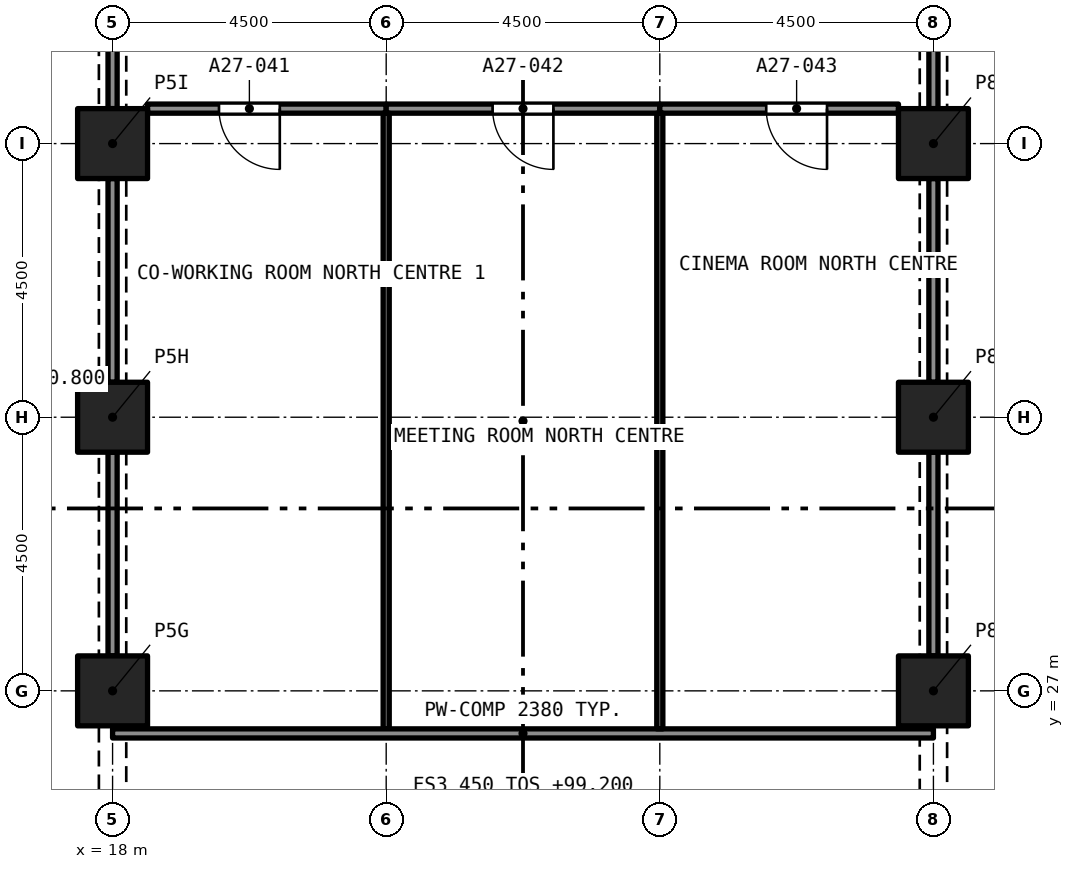
"""IFC4 building model, lengths in metres.
Left out: names, types, materials, properties, quantities, classifications, styles, units other than length and angle.
Written with IfcOpenShell. Run it as: python <this file> out.ifc"""

import sys

from ifc_helpers import new_model, si_unit, direction, frame, frame_2d, origin, origin_2d, place, context, subcontext, project, spatial, rectangle, extrude, element, fill, save


model = new_model("IFC4")
c1 = context("Model", 3, precision=1e-05, world=origin(), true_north=direction((0.0, 1.0)))
c2 = subcontext(c1, "Body", "Model", "MODEL_VIEW")
j1 = project(units=[si_unit("LENGTHUNIT", "METRE"), si_unit("PLANEANGLEUNIT", "RADIAN")], contexts=[c1])
p1 = place(None, origin())
s1 = spatial("IfcSite", under=j1, at=p1, CompositionType="ELEMENT")
p2 = place(p1, origin())
s2 = spatial("IfcBuilding", under=s1, at=p2, CompositionType="ELEMENT")
p3 = place(p2, frame((0.0, 0.0, 99.2)))
s3 = spatial("IfcBuildingStorey", under=s2, at=p3, CompositionType="ELEMENT", Elevation=99.2)
for number, where, z_axis, x_axis in (
    (1, (18.0, 27.0, 0.0), (0.0, 0.0, 1.0), (1.0, 0.0, 0.0)),
    (2, (31.5, 27.0, 0.0), (0.0, 0.0, 1.0), (1.0, 0.0, 0.0)),
    (3, (18.0, 31.5, 0.0), (0.0, 0.0, 1.0), (1.0, 0.0, 0.0)),
    (4, (31.5, 31.5, 0.0), (0.0, 0.0, 1.0), (1.0, 0.0, 0.0)),
    (5, (18.0, 36.0, 0.0), (0.0, 0.0, 1.0), (1.0, 0.0, 0.0)),
    (6, (31.5, 36.0, 0.0), (0.0, 0.0, 1.0), (1.0, 0.0, 0.0)),
):
    element("IfcColumn", number, at=place(p3, frame(where, z_axis=z_axis, x_axis=x_axis)), inside=s3, PredefinedType="COLUMN", context=c2, shape_type="SweptSolid", body=[
        extrude(rectangle(XDim=1.15, YDim=1.15, at=origin_2d()), origin(), (0.0, 0.0, 1.0), 3.2),
    ])
p4 = place(p3, frame((22.5, 36.575, 0.0), z_axis=(0.0, 0.0, 1.0), x_axis=(-1.0, 0.0, 0.0)))
e7 = element("IfcWall", 7, at=p4, inside=s3, PredefinedType="PARTITIONING", context=c2, shape_type="SweptSolid", body=[
    extrude(rectangle(XDim=3.925, YDim=0.15, at=frame_2d((1.962, 0.0))), origin(), (0.0, 0.0, 1.0), 2.75),
])
p5 = place(p4, frame((1.75, 0.0, 0.0)))
e8 = element("IfcOpeningElement", 8, at=p5, cuts=e7, PredefinedType="OPENING", context=c2, shape_type="SweptSolid", body=[
    extrude(rectangle(XDim=1.0, YDim=2.1, at=frame_2d((0.5, 1.05))), frame((0.0, 0.085, 0.0), z_axis=(0.0, -1.0, 0.0), x_axis=(1.0, 0.0, 0.0)), (0.0, 0.0, 1.0), 0.17),
])
p6 = place(p3, frame((27.0, 36.575, 0.0), z_axis=(0.0, 0.0, 1.0), x_axis=(-1.0, 0.0, 0.0)))
e9 = element("IfcWall", 9, at=p6, inside=s3, PredefinedType="PARTITIONING", context=c2, shape_type="SweptSolid", body=[
    extrude(rectangle(XDim=4.5, YDim=0.15, at=frame_2d((2.25, 0.0))), origin(), (0.0, 0.0, 1.0), 2.75),
])
p7 = place(p6, frame((1.75, 0.0, 0.0)))
e10 = element("IfcOpeningElement", 10, at=p7, cuts=e9, PredefinedType="OPENING", context=c2, shape_type="SweptSolid", body=[
    extrude(rectangle(XDim=1.0, YDim=2.1, at=frame_2d((0.5, 1.05))), frame((0.0, 0.085, 0.0), z_axis=(0.0, -1.0, 0.0), x_axis=(1.0, 0.0, 0.0)), (0.0, 0.0, 1.0), 0.17),
])
p8 = place(p3, frame((30.925, 36.575, 0.0), z_axis=(0.0, 0.0, 1.0), x_axis=(-1.0, 0.0, 0.0)))
e11 = element("IfcWall", 11, at=p8, inside=s3, PredefinedType="PARTITIONING", context=c2, shape_type="SweptSolid", body=[
    extrude(rectangle(XDim=3.925, YDim=0.15, at=frame_2d((1.962, 0.0))), origin(), (0.0, 0.0, 1.0), 2.75),
])
p9 = place(p8, frame((1.175, 0.0, 0.0)))
e12 = element("IfcOpeningElement", 12, at=p9, cuts=e11, PredefinedType="OPENING", context=c2, shape_type="SweptSolid", body=[
    extrude(rectangle(XDim=1.0, YDim=2.1, at=frame_2d((0.5, 1.05))), frame((0.0, 0.085, 0.0), z_axis=(0.0, -1.0, 0.0), x_axis=(1.0, 0.0, 0.0)), (0.0, 0.0, 1.0), 0.17),
])
p10 = place(p3, frame((31.5, 36.575, 0.0), z_axis=(0.0, 0.0, 1.0), x_axis=(0.0, 1.0, 0.0)))
e13 = element("IfcWall", 13, at=p10, inside=s3, PredefinedType="PARTITIONING", context=c2, shape_type="SweptSolid", body=[
    extrude(rectangle(XDim=3.35, YDim=0.15, at=frame_2d((1.675, 0.0))), origin(), (0.0, 0.0, 1.0), 2.38),
])
p11 = place(p10, frame((1.075, 0.0, 0.0)))
e14 = element("IfcOpeningElement", 14, at=p11, cuts=e13, PredefinedType="OPENING", context=c2, shape_type="SweptSolid", body=[
    extrude(rectangle(XDim=1.2, YDim=2.1, at=frame_2d((0.6, 1.05))), frame((0.0, 0.085, 0.0), z_axis=(0.0, -1.0, 0.0), x_axis=(1.0, 0.0, 0.0)), (0.0, 0.0, 1.0), 0.17),
])
p12 = place(p3, frame((18.0, 39.925, 0.0), z_axis=(0.0, 0.0, 1.0), x_axis=(0.0, -1.0, 0.0)))
e15 = element("IfcWall", 15, at=p12, inside=s3, PredefinedType="PARTITIONING", context=c2, shape_type="SweptSolid", body=[
    extrude(rectangle(XDim=3.35, YDim=0.15, at=frame_2d((1.675, 0.0))), origin(), (0.0, 0.0, 1.0), 2.38),
])
p13 = place(p12, frame((1.075, 0.0, 0.0)))
e16 = element("IfcOpeningElement", 16, at=p13, cuts=e15, PredefinedType="OPENING", context=c2, shape_type="SweptSolid", body=[
    extrude(rectangle(XDim=1.2, YDim=2.1, at=frame_2d((0.6, 1.05))), frame((0.0, 0.085, 0.0), z_axis=(0.0, -1.0, 0.0), x_axis=(1.0, 0.0, 0.0)), (0.0, 0.0, 1.0), 0.17),
])
p14 = place(p3, frame((22.5, 26.375, 0.0), z_axis=(0.0, 0.0, 1.0), x_axis=(0.0, 1.0, 0.0)))
e17 = element("IfcWall", 17, at=p14, inside=s3, PredefinedType="PARTITIONING", context=c2, shape_type="SweptSolid", body=[
    extrude(rectangle(XDim=10.125, YDim=0.1, at=frame_2d((5.062, 0.0))), origin(), (0.0, 0.0, 1.0), 2.75),
])
for number, where, z_axis, x_axis in (
    (18, (18.0, 27.575, 0.0), (0.0, 0.0, 1.0), (0.0, 1.0, 0.0)),
    (19, (18.0, 32.075, 0.0), (0.0, 0.0, 1.0), (0.0, 1.0, 0.0)),
):
    element("IfcWall", number, at=place(p3, frame(where, z_axis=z_axis, x_axis=x_axis)), inside=s3, PredefinedType="PARTITIONING", context=c2, shape_type="SweptSolid", body=[
        extrude(rectangle(XDim=3.35, YDim=0.15, at=frame_2d((1.675, 0.0))), origin(), (0.0, 0.0, 1.0), 2.38),
    ])
p15 = place(p3, frame((18.0, 26.3, 0.0), z_axis=(0.0, 0.0, 1.0), x_axis=(1.0, 0.0, 0.0)))
e20 = element("IfcWall", 20, at=p15, inside=s3, PredefinedType="PARTITIONING", context=c2, shape_type="SweptSolid", body=[
    extrude(rectangle(XDim=13.5, YDim=0.15, at=frame_2d((6.75, 0.0))), origin(), (0.0, 0.0, 1.0), 2.38),
])
p16 = place(p3, frame((27.0, 26.375, 0.0), z_axis=(0.0, 0.0, 1.0), x_axis=(0.0, 1.0, 0.0)))
e21 = element("IfcWall", 21, at=p16, inside=s3, PredefinedType="PARTITIONING", context=c2, shape_type="SweptSolid", body=[
    extrude(rectangle(XDim=10.125, YDim=0.1, at=frame_2d((5.062, 0.0))), origin(), (0.0, 0.0, 1.0), 2.75),
])
for number, where, z_axis, x_axis in (
    (22, (31.5, 32.075, 0.0), (0.0, 0.0, 1.0), (0.0, 1.0, 0.0)),
    (23, (31.5, 27.575, 0.0), (0.0, 0.0, 1.0), (0.0, 1.0, 0.0)),
):
    element("IfcWall", number, at=place(p3, frame(where, z_axis=z_axis, x_axis=x_axis)), inside=s3, PredefinedType="PARTITIONING", context=c2, shape_type="SweptSolid", body=[
        extrude(rectangle(XDim=3.35, YDim=0.15, at=frame_2d((1.675, 0.0))), origin(), (0.0, 0.0, 1.0), 2.38),
    ])
p17 = place(p5, origin())
e24 = element("IfcDoor", 24, at=p17, inside=s3, OperationType="SINGLE_SWING_RIGHT", PredefinedType="DOOR", context=c2, shape_type="SweptSolid", body=[
    extrude(rectangle(XDim=1.0, YDim=2.1, at=frame_2d((0.5, 1.05))), frame((0.0, 0.025, 0.0), z_axis=(0.0, -1.0, 0.0), x_axis=(1.0, 0.0, 0.0)), (0.0, 0.0, 1.0), 0.05),
])
fill(e8, e24)
p18 = place(p7, origin())
e25 = element("IfcDoor", 25, at=p18, inside=s3, OperationType="SINGLE_SWING_RIGHT", PredefinedType="DOOR", context=c2, shape_type="SweptSolid", body=[
    extrude(rectangle(XDim=1.0, YDim=2.1, at=frame_2d((0.5, 1.05))), frame((0.0, 0.025, 0.0), z_axis=(0.0, -1.0, 0.0), x_axis=(1.0, 0.0, 0.0)), (0.0, 0.0, 1.0), 0.05),
])
fill(e10, e25)
p19 = place(p9, origin())
e26 = element("IfcDoor", 26, at=p19, inside=s3, OperationType="SINGLE_SWING_LEFT", PredefinedType="DOOR", context=c2, shape_type="SweptSolid", body=[
    extrude(rectangle(XDim=1.0, YDim=2.1, at=frame_2d((0.5, 1.05))), frame((0.0, 0.025, 0.0), z_axis=(0.0, -1.0, 0.0), x_axis=(1.0, 0.0, 0.0)), (0.0, 0.0, 1.0), 0.05),
])
fill(e12, e26)
save(model, sys.argv[1])
